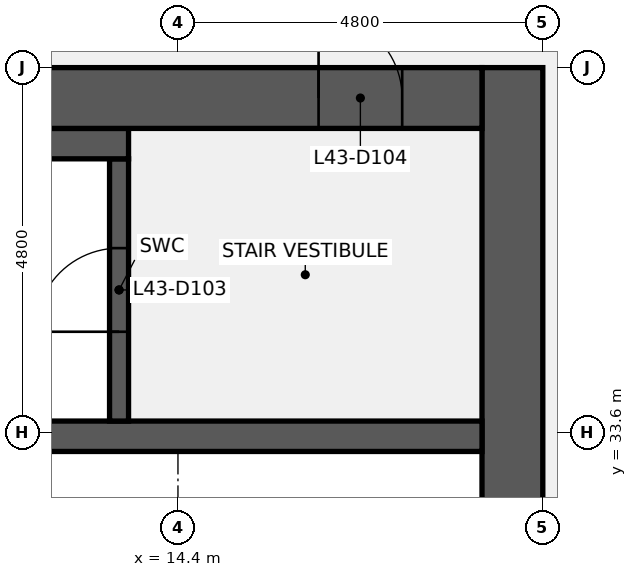
"""IFC4 building model, lengths in metres.
Left out: names, types, materials, properties, quantities, classifications, styles, units other than length and angle.
Written with IfcOpenShell. Run it as: python <this file> out.ifc"""

import sys

from ifc_helpers import new_model, si_unit, direction, frame, frame_2d, origin, place, context, subcontext, project, spatial, rectangle, extrude, element, fill, save


model = new_model("IFC4")
c1 = context("Model", 3, precision=1e-05, world=origin(), true_north=direction((0.0, 1.0)))
c2 = subcontext(c1, "Body", "Model", "MODEL_VIEW")
j1 = project(units=[si_unit("LENGTHUNIT", "METRE"), si_unit("PLANEANGLEUNIT", "RADIAN")], contexts=[c1])
p1 = place(None, origin())
s1 = spatial("IfcSite", under=j1, at=p1, CompositionType="ELEMENT")
p2 = place(p1, origin())
s2 = spatial("IfcBuilding", under=s1, at=p2, CompositionType="ELEMENT")
p3 = place(p2, frame((0.0, 0.0, 201.2)))
s3 = spatial("IfcBuildingStorey", under=s2, at=p3, CompositionType="ELEMENT", Elevation=201.2)
p4 = place(p3, frame((18.8, 38.4, 0.0), z_axis=(0.0, 0.0, 1.0), x_axis=(0.0, -1.0, 0.0)))
e1 = element("IfcWall", 1, at=p4, inside=s3, PredefinedType="SHEAR", context=c2, shape_type="SweptSolid", body=[
    extrude(rectangle(XDim=28.8, YDim=0.8, at=frame_2d((14.4, 0.0))), origin(), (0.0, 0.0, 1.0), 3.84),
])
p5 = place(p4, frame((18.3, 0.0, 0.0)))
e2 = element("IfcOpeningElement", 2, at=p5, cuts=e1, PredefinedType="OPENING", context=c2, shape_type="SweptSolid", body=[
    extrude(rectangle(XDim=1.8, YDim=2.1, at=frame_2d((0.9, 1.05))), frame((0.0, 0.41, 0.0), z_axis=(0.0, -1.0, 0.0), x_axis=(1.0, 0.0, 0.0)), (0.0, 0.0, 1.0), 0.82),
])
p6 = place(p4, frame((8.7, 0.0, 0.0)))
e3 = element("IfcOpeningElement", 3, at=p6, cuts=e1, PredefinedType="OPENING", context=c2, shape_type="SweptSolid", body=[
    extrude(rectangle(XDim=1.8, YDim=2.1, at=frame_2d((0.9, 1.05))), frame((0.0, 0.41, 0.0), z_axis=(0.0, -1.0, 0.0), x_axis=(1.0, 0.0, 0.0)), (0.0, 0.0, 1.0), 0.82),
])
p7 = place(p3, frame((0.8, 33.55, 0.0), z_axis=(0.0, 0.0, 1.0), x_axis=(1.0, 0.0, 0.0)))
e4 = element("IfcWall", 4, at=p7, inside=s3, PredefinedType="SHEAR", context=c2, shape_type="SweptSolid", body=[
    extrude(rectangle(XDim=17.6, YDim=0.4, at=frame_2d((8.8, 0.0))), origin(), (0.0, 0.0, 1.0), 3.84),
])
p8 = place(p3, frame((13.625, 33.75, 0.0), z_axis=(0.0, 0.0, 1.0), x_axis=(0.0, 1.0, 0.0)))
e5 = element("IfcWall", 5, at=p8, inside=s3, PredefinedType="SHEAR", context=c2, shape_type="SweptSolid", body=[
    extrude(rectangle(XDim=3.45, YDim=0.25, at=frame_2d((1.725, 0.0))), origin(), (0.0, 0.0, 1.0), 3.84),
])
p9 = place(p8, frame((1.175, 0.0, 0.0)))
e6 = element("IfcOpeningElement", 6, at=p9, cuts=e5, PredefinedType="OPENING", context=c2, shape_type="SweptSolid", body=[
    extrude(rectangle(XDim=1.1, YDim=2.1, at=frame_2d((0.55, 1.05))), frame((0.0, 0.135, 0.0), z_axis=(0.0, -1.0, 0.0), x_axis=(1.0, 0.0, 0.0)), (0.0, 0.0, 1.0), 0.27),
])
p10 = place(p3, frame((9.6, 37.4, 0.0), z_axis=(0.0, 0.0, 1.0), x_axis=(1.0, 0.0, 0.0)))
e7 = element("IfcWall", 7, at=p10, inside=s3, PredefinedType="SHEAR", context=c2, shape_type="SweptSolid", body=[
    extrude(rectangle(XDim=4.15, YDim=0.4, at=frame_2d((2.075, 0.0))), origin(), (0.0, 0.0, 1.0), 3.84),
])
p11 = place(p3, frame((9.6, 38.0, 0.0), z_axis=(0.0, 0.0, 1.0), x_axis=(1.0, 0.0, 0.0)))
e8 = element("IfcWall", 8, at=p11, inside=s3, PredefinedType="SHEAR", context=c2, shape_type="SweptSolid", body=[
    extrude(rectangle(XDim=8.8, YDim=0.8, at=frame_2d((4.4, 0.0))), origin(), (0.0, 0.0, 1.0), 3.84),
])
p12 = place(p11, frame((6.65, 0.0, 0.0)))
e9 = element("IfcOpeningElement", 9, at=p12, cuts=e8, PredefinedType="OPENING", context=c2, shape_type="SweptSolid", body=[
    extrude(rectangle(XDim=1.1, YDim=2.1, at=frame_2d((0.55, 1.05))), frame((0.0, 0.41, 0.0), z_axis=(0.0, -1.0, 0.0), x_axis=(1.0, 0.0, 0.0)), (0.0, 0.0, 1.0), 0.82),
])
p13 = place(p9, origin())
e10 = element("IfcDoor", 10, at=p13, inside=s3, OperationType="SINGLE_SWING_LEFT", PredefinedType="DOOR", context=c2, shape_type="SweptSolid", body=[
    extrude(rectangle(XDim=1.1, YDim=2.1, at=frame_2d((0.55, 1.05))), frame((0.0, 0.025, 0.0), z_axis=(0.0, -1.0, 0.0), x_axis=(1.0, 0.0, 0.0)), (0.0, 0.0, 1.0), 0.05),
])
fill(e6, e10)
p14 = place(p12, origin())
e11 = element("IfcDoor", 11, at=p14, inside=s3, OperationType="SINGLE_SWING_LEFT", PredefinedType="DOOR", context=c2, shape_type="SweptSolid", body=[
    extrude(rectangle(XDim=1.1, YDim=2.1, at=frame_2d((0.55, 1.05))), frame((0.0, 0.025, 0.0), z_axis=(0.0, -1.0, 0.0), x_axis=(1.0, 0.0, 0.0)), (0.0, 0.0, 1.0), 0.05),
])
fill(e9, e11)
save(model, sys.argv[1])
